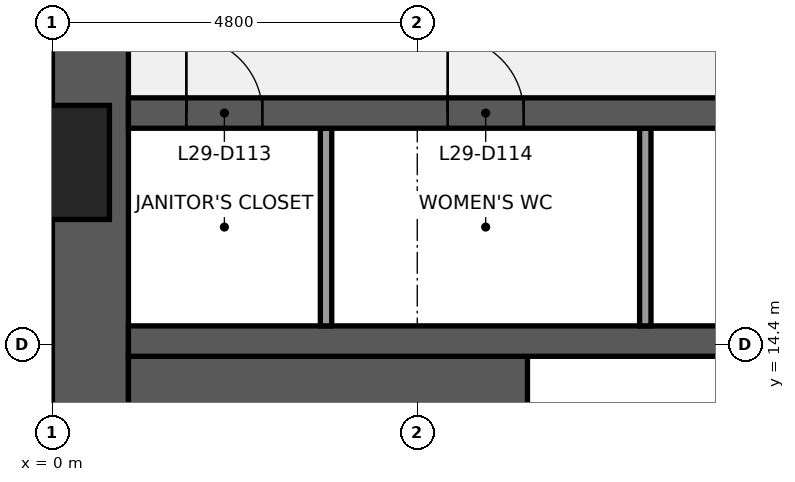
"""IFC4 building model, lengths in metres.
Left out: names, types, materials, properties, quantities, classifications, styles, units other than length and angle.
Written with IfcOpenShell. Run it as: python <this file> out.ifc"""

import sys

from ifc_helpers import new_model, si_unit, direction, frame, frame_2d, origin, place, context, subcontext, project, spatial, rectangle, extrude, element, fill, save


model = new_model("IFC4")
c1 = context("Model", 3, precision=1e-05, world=origin(), true_north=direction((0.0, 1.0)))
c2 = subcontext(c1, "Body", "Model", "MODEL_VIEW")
j1 = project(units=[si_unit("LENGTHUNIT", "METRE"), si_unit("PLANEANGLEUNIT", "RADIAN")], contexts=[c1])
p1 = place(None, origin())
s1 = spatial("IfcSite", under=j1, at=p1, CompositionType="ELEMENT")
p2 = place(p1, origin())
s2 = spatial("IfcBuilding", under=s1, at=p2, CompositionType="ELEMENT")
p3 = place(p2, frame((0.0, 0.0, 136.1)))
s3 = spatial("IfcBuildingStorey", under=s2, at=p3, CompositionType="ELEMENT", Elevation=136.1)
p4 = place(p3, frame((0.5, 9.6, 0.0), z_axis=(0.0, 0.0, 1.0), x_axis=(0.0, 1.0, 0.0)))
e1 = element("IfcWall", 1, at=p4, inside=s3, PredefinedType="SHEAR", context=c2, shape_type="SweptSolid", body=[
    extrude(rectangle(XDim=28.8, YDim=1.0, at=frame_2d((14.4, 0.0))), origin(), (0.0, 0.0, 1.0), 3.84),
])
p5 = place(p4, frame((8.85, 0.0, 0.9)))
e2 = element("IfcOpeningElement", 2, at=p5, cuts=e1, PredefinedType="OPENING", context=c2, shape_type="SweptSolid", body=[
    extrude(rectangle(XDim=1.5, YDim=1.5, at=frame_2d((0.75, 0.75))), frame((0.0, 0.51, 0.0), z_axis=(0.0, -1.0, 0.0), x_axis=(1.0, 0.0, 0.0)), (0.0, 0.0, 1.0), 1.02),
])
p6 = place(p4, frame((18.45, 0.0, 0.9)))
e3 = element("IfcOpeningElement", 3, at=p6, cuts=e1, PredefinedType="OPENING", context=c2, shape_type="SweptSolid", body=[
    extrude(rectangle(XDim=1.5, YDim=1.5, at=frame_2d((0.75, 0.75))), frame((0.0, 0.51, 0.0), z_axis=(0.0, -1.0, 0.0), x_axis=(1.0, 0.0, 0.0)), (0.0, 0.0, 1.0), 1.02),
])
p7 = place(p3, frame((1.0, 12.425, 0.0), z_axis=(0.0, 0.0, 1.0), x_axis=(1.0, 0.0, 0.0)))
e4 = element("IfcWall", 4, at=p7, inside=s3, PredefinedType="SHEAR", context=c2, shape_type="SweptSolid", body=[
    extrude(rectangle(XDim=5.25, YDim=3.65, at=frame_2d((2.625, 0.0))), origin(), (0.0, 0.0, 1.0), 3.84),
])
p8 = place(p3, frame((1.0, 14.45, 0.0), z_axis=(0.0, 0.0, 1.0), x_axis=(1.0, 0.0, 0.0)))
e5 = element("IfcWall", 5, at=p8, inside=s3, PredefinedType="SHEAR", context=c2, shape_type="SweptSolid", body=[
    extrude(rectangle(XDim=17.2, YDim=0.4, at=frame_2d((8.6, 0.0))), origin(), (0.0, 0.0, 1.0), 3.84),
])
for number, where, z_axis, x_axis in (
    (6, (3.6, 14.65, 0.0), (0.0, 0.0, 1.0), (0.0, 1.0, 0.0)),
    (7, (7.8, 14.65, 0.0), (0.0, 0.0, 1.0), (0.0, 1.0, 0.0)),
):
    element("IfcWall", number, at=place(p3, frame(where, z_axis=z_axis, x_axis=x_axis)), inside=s3, PredefinedType="PARTITIONING", context=c2, shape_type="SweptSolid", body=[
        extrude(rectangle(XDim=2.6, YDim=0.15, at=frame_2d((1.3, 0.0))), origin(), (0.0, 0.0, 1.0), 3.84),
    ])
p9 = place(p3, frame((1.0, 17.45, 0.0), z_axis=(0.0, 0.0, 1.0), x_axis=(1.0, 0.0, 0.0)))
e8 = element("IfcWall", 8, at=p9, inside=s3, PredefinedType="SHEAR", context=c2, shape_type="SweptSolid", body=[
    extrude(rectangle(XDim=17.2, YDim=0.4, at=frame_2d((8.6, 0.0))), origin(), (0.0, 0.0, 1.0), 3.84),
])
p10 = place(p9, frame((0.762, 0.0, 0.0)))
e9 = element("IfcOpeningElement", 9, at=p10, cuts=e8, PredefinedType="OPENING", context=c2, shape_type="SweptSolid", body=[
    extrude(rectangle(XDim=1.0, YDim=2.1, at=frame_2d((0.5, 1.05))), frame((0.0, 0.21, 0.0), z_axis=(0.0, -1.0, 0.0), x_axis=(1.0, 0.0, 0.0)), (0.0, 0.0, 1.0), 0.42),
])
p11 = place(p9, frame((4.2, 0.0, 0.0)))
e10 = element("IfcOpeningElement", 10, at=p11, cuts=e8, PredefinedType="OPENING", context=c2, shape_type="SweptSolid", body=[
    extrude(rectangle(XDim=1.0, YDim=2.1, at=frame_2d((0.5, 1.05))), frame((0.0, 0.21, 0.0), z_axis=(0.0, -1.0, 0.0), x_axis=(1.0, 0.0, 0.0)), (0.0, 0.0, 1.0), 0.42),
])
p12 = place(p9, frame((8.4, 0.0, 0.0)))
e11 = element("IfcOpeningElement", 11, at=p12, cuts=e8, PredefinedType="OPENING", context=c2, shape_type="SweptSolid", body=[
    extrude(rectangle(XDim=1.0, YDim=2.1, at=frame_2d((0.5, 1.05))), frame((0.0, 0.21, 0.0), z_axis=(0.0, -1.0, 0.0), x_axis=(1.0, 0.0, 0.0)), (0.0, 0.0, 1.0), 0.42),
])
p13 = place(p9, frame((13.637, 0.0, 0.0)))
e12 = element("IfcOpeningElement", 12, at=p13, cuts=e8, PredefinedType="OPENING", context=c2, shape_type="SweptSolid", body=[
    extrude(rectangle(XDim=1.0, YDim=2.1, at=frame_2d((0.5, 1.05))), frame((0.0, 0.21, 0.0), z_axis=(0.0, -1.0, 0.0), x_axis=(1.0, 0.0, 0.0)), (0.0, 0.0, 1.0), 0.42),
])
p14 = place(p10, origin())
e13 = element("IfcDoor", 13, at=p14, inside=s3, OperationType="SINGLE_SWING_LEFT", PredefinedType="DOOR", context=c2, shape_type="SweptSolid", body=[
    extrude(rectangle(XDim=1.0, YDim=2.1, at=frame_2d((0.5, 1.05))), frame((0.0, 0.025, 0.0), z_axis=(0.0, -1.0, 0.0), x_axis=(1.0, 0.0, 0.0)), (0.0, 0.0, 1.0), 0.05),
])
fill(e9, e13)
p15 = place(p11, origin())
e14 = element("IfcDoor", 14, at=p15, inside=s3, OperationType="SINGLE_SWING_LEFT", PredefinedType="DOOR", context=c2, shape_type="SweptSolid", body=[
    extrude(rectangle(XDim=1.0, YDim=2.1, at=frame_2d((0.5, 1.05))), frame((0.0, 0.025, 0.0), z_axis=(0.0, -1.0, 0.0), x_axis=(1.0, 0.0, 0.0)), (0.0, 0.0, 1.0), 0.05),
])
fill(e10, e14)
save(model, sys.argv[1])
